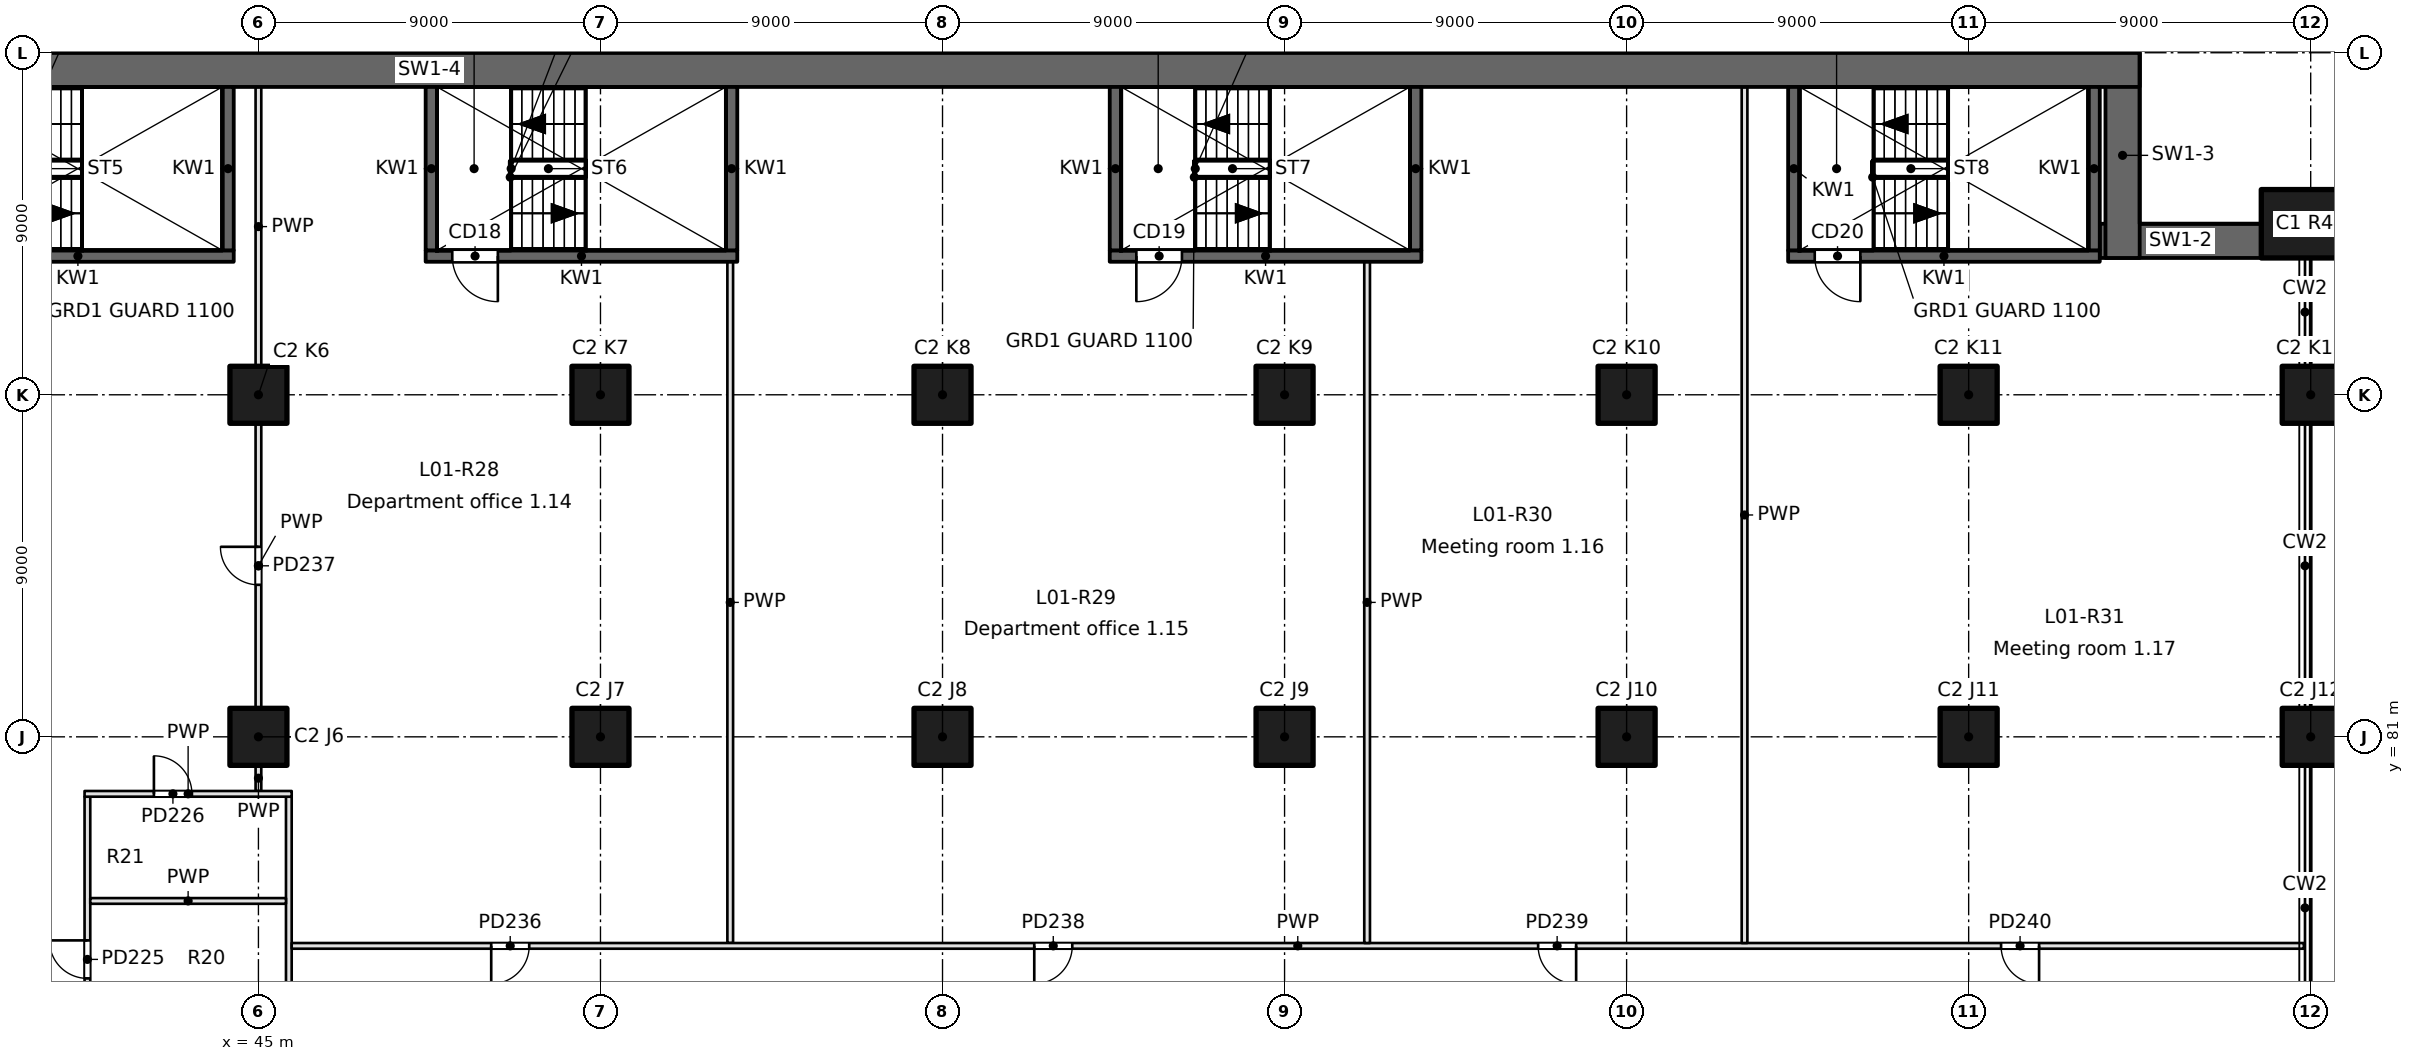
"""IFC4 building model, lengths in metres.
Left out: names, types, materials, properties, quantities, classifications, styles, units other than length and angle.
Written with IfcOpenShell. Run it as: python <this file> out.ifc"""

import sys

from ifc_helpers import new_model, si_unit, direction, frame, frame_2d, origin, origin_2d, place, context, subcontext, project, spatial, rectangle, extrude, element, fill, save


model = new_model("IFC4")
c1 = context("Model", 3, precision=1e-05, world=origin(), true_north=direction((0.0, 1.0)))
c2 = subcontext(c1, "Body", "Model", "MODEL_VIEW")
j1 = project(units=[si_unit("LENGTHUNIT", "METRE"), si_unit("PLANEANGLEUNIT", "RADIAN")], contexts=[c1])
p1 = place(None, origin())
s1 = spatial("IfcSite", under=j1, at=p1, CompositionType="ELEMENT")
p2 = place(p1, origin())
s2 = spatial("IfcBuilding", under=s1, at=p2, CompositionType="ELEMENT")
p3 = place(p2, frame((0.0, 0.0, 6.0)))
s3 = spatial("IfcBuildingStorey", under=s2, at=p3, CompositionType="ELEMENT", Elevation=6.0)
for number, where, z_axis, x_axis in (
    (1, (99.0, 81.0, 0.0), (0.0, 0.0, 1.0), (1.0, 0.0, 0.0)),
    (2, (99.0, 90.0, 0.0), (0.0, 0.0, 1.0), (1.0, 0.0, 0.0)),
):
    element("IfcColumn", number, at=place(p3, frame(where, z_axis=z_axis, x_axis=x_axis)), inside=s3, PredefinedType="COLUMN", context=c2, shape_type="SweptSolid", body=[
        extrude(rectangle(XDim=1.5, YDim=1.5, at=origin_2d()), origin(), (0.0, 0.0, 1.0), 5.4),
    ])
p4 = place(p3, frame((99.0, 94.5, 0.0), z_axis=(0.0, 0.0, 1.0), x_axis=(1.0, 0.0, 0.0)))
e3 = element("IfcColumn", 3, at=p4, inside=s3, PredefinedType="COLUMN", context=c2, shape_type="SweptSolid", body=[
    extrude(rectangle(XDim=2.6, YDim=1.8, at=origin_2d()), origin(), (0.0, 0.0, 1.0), 5.4),
])
for number, where, z_axis, x_axis in (
    (4, (45.0, 81.0, 0.0), (0.0, 0.0, 1.0), (1.0, 0.0, 0.0)),
    (5, (45.0, 90.0, 0.0), (0.0, 0.0, 1.0), (1.0, 0.0, 0.0)),
    (6, (54.0, 81.0, 0.0), (0.0, 0.0, 1.0), (1.0, 0.0, 0.0)),
    (7, (54.0, 90.0, 0.0), (0.0, 0.0, 1.0), (1.0, 0.0, 0.0)),
    (8, (63.0, 81.0, 0.0), (0.0, 0.0, 1.0), (1.0, 0.0, 0.0)),
    (9, (63.0, 90.0, 0.0), (0.0, 0.0, 1.0), (1.0, 0.0, 0.0)),
    (10, (72.0, 81.0, 0.0), (0.0, 0.0, 1.0), (1.0, 0.0, 0.0)),
    (11, (72.0, 90.0, 0.0), (0.0, 0.0, 1.0), (1.0, 0.0, 0.0)),
    (12, (81.0, 81.0, 0.0), (0.0, 0.0, 1.0), (1.0, 0.0, 0.0)),
    (13, (81.0, 90.0, 0.0), (0.0, 0.0, 1.0), (1.0, 0.0, 0.0)),
    (14, (90.0, 81.0, 0.0), (0.0, 0.0, 1.0), (1.0, 0.0, 0.0)),
    (15, (90.0, 90.0, 0.0), (0.0, 0.0, 1.0), (1.0, 0.0, 0.0)),
):
    element("IfcColumn", number, at=place(p3, frame(where, z_axis=z_axis, x_axis=x_axis)), inside=s3, PredefinedType="COLUMN", context=c2, shape_type="SweptSolid", body=[
        extrude(rectangle(XDim=1.5, YDim=1.5, at=origin_2d()), origin(), (0.0, 0.0, 1.0), 5.4),
    ])
p5 = place(p3, frame((97.7, 94.05, 0.0), z_axis=(0.0, 0.0, 1.0), x_axis=(-1.0, 0.0, 0.0)))
e16 = element("IfcWall", 16, at=p5, inside=s3, PredefinedType="SHEAR", context=c2, shape_type="SweptSolid", body=[
    extrude(rectangle(XDim=4.25, YDim=0.9, at=frame_2d((2.125, 0.0))), origin(), (0.0, 0.0, 1.0), 5.4),
])
p6 = place(p3, frame((94.05, 93.6, 0.0), z_axis=(0.0, 0.0, 1.0), x_axis=(0.0, 1.0, 0.0)))
e17 = element("IfcWall", 17, at=p6, inside=s3, PredefinedType="SHEAR", context=c2, shape_type="SweptSolid", body=[
    extrude(rectangle(XDim=5.4, YDim=0.9, at=frame_2d((2.7, 0.0))), origin(), (0.0, 0.0, 1.0), 5.4),
])
p7 = place(p3, frame((94.5, 98.55, 0.0), z_axis=(0.0, 0.0, 1.0), x_axis=(-1.0, 0.0, 0.0)))
e18 = element("IfcWall", 18, at=p7, inside=s3, PredefinedType="SHEAR", context=c2, shape_type="SweptSolid", body=[
    extrude(rectangle(XDim=90.0, YDim=0.9, at=frame_2d((45.0, 0.0))), origin(), (0.0, 0.0, 1.0), 5.4),
])
p8 = place(p3, frame((36.15, 93.65, -0.35), z_axis=(0.0, 0.0, 1.0), x_axis=(1.0, 0.0, 0.0)))
e19 = element("IfcWall", 19, at=p8, inside=s3, PredefinedType="SOLIDWALL", context=c2, shape_type="SweptSolid", body=[
    extrude(rectangle(XDim=8.2, YDim=0.3, at=frame_2d((4.1, 0.0))), origin(), (0.0, 0.0, 1.0), 5.4),
])
p9 = place(p8, frame((0.7, 0.0, 0.35)))
e20 = element("IfcOpeningElement", 20, at=p9, cuts=e19, PredefinedType="OPENING", context=c2, shape_type="SweptSolid", body=[
    extrude(rectangle(XDim=1.2, YDim=2.1, at=frame_2d((0.6, 1.05))), frame((0.0, 0.15, 0.0), z_axis=(0.0, -1.0, 0.0), x_axis=(1.0, 0.0, 0.0)), (0.0, 0.0, 1.0), 0.3),
])
p10 = place(p3, frame((49.4, 93.65, -0.35), z_axis=(0.0, 0.0, 1.0), x_axis=(1.0, 0.0, 0.0)))
e21 = element("IfcWall", 21, at=p10, inside=s3, PredefinedType="SOLIDWALL", context=c2, shape_type="SweptSolid", body=[
    extrude(rectangle(XDim=8.2, YDim=0.3, at=frame_2d((4.1, 0.0))), origin(), (0.0, 0.0, 1.0), 5.4),
])
p11 = place(p10, frame((0.7, 0.0, 0.35)))
e22 = element("IfcOpeningElement", 22, at=p11, cuts=e21, PredefinedType="OPENING", context=c2, shape_type="SweptSolid", body=[
    extrude(rectangle(XDim=1.2, YDim=2.1, at=frame_2d((0.6, 1.05))), frame((0.0, 0.15, 0.0), z_axis=(0.0, -1.0, 0.0), x_axis=(1.0, 0.0, 0.0)), (0.0, 0.0, 1.0), 0.3),
])
p12 = place(p3, frame((67.4, 93.65, -0.35), z_axis=(0.0, 0.0, 1.0), x_axis=(1.0, 0.0, 0.0)))
e23 = element("IfcWall", 23, at=p12, inside=s3, PredefinedType="SOLIDWALL", context=c2, shape_type="SweptSolid", body=[
    extrude(rectangle(XDim=8.2, YDim=0.3, at=frame_2d((4.1, 0.0))), origin(), (0.0, 0.0, 1.0), 5.4),
])
p13 = place(p12, frame((0.7, 0.0, 0.35)))
e24 = element("IfcOpeningElement", 24, at=p13, cuts=e23, PredefinedType="OPENING", context=c2, shape_type="SweptSolid", body=[
    extrude(rectangle(XDim=1.2, YDim=2.1, at=frame_2d((0.6, 1.05))), frame((0.0, 0.15, 0.0), z_axis=(0.0, -1.0, 0.0), x_axis=(1.0, 0.0, 0.0)), (0.0, 0.0, 1.0), 0.3),
])
p14 = place(p3, frame((85.25, 93.65, -0.35), z_axis=(0.0, 0.0, 1.0), x_axis=(1.0, 0.0, 0.0)))
e25 = element("IfcWall", 25, at=p14, inside=s3, PredefinedType="SOLIDWALL", context=c2, shape_type="SweptSolid", body=[
    extrude(rectangle(XDim=8.2, YDim=0.3, at=frame_2d((4.1, 0.0))), origin(), (0.0, 0.0, 1.0), 5.4),
])
p15 = place(p14, frame((0.7, 0.0, 0.35)))
e26 = element("IfcOpeningElement", 26, at=p15, cuts=e25, PredefinedType="OPENING", context=c2, shape_type="SweptSolid", body=[
    extrude(rectangle(XDim=1.2, YDim=2.1, at=frame_2d((0.6, 1.05))), frame((0.0, 0.15, 0.0), z_axis=(0.0, -1.0, 0.0), x_axis=(1.0, 0.0, 0.0)), (0.0, 0.0, 1.0), 0.3),
])
for number, where, z_axis, x_axis in (
    (27, (44.2, 93.8, -0.35), (0.0, 0.0, 1.0), (0.0, 1.0, 0.0)),
    (28, (49.55, 93.8, -0.35), (0.0, 0.0, 1.0), (0.0, 1.0, 0.0)),
    (29, (57.45, 93.8, -0.35), (0.0, 0.0, 1.0), (0.0, 1.0, 0.0)),
    (30, (67.55, 93.8, -0.35), (0.0, 0.0, 1.0), (0.0, 1.0, 0.0)),
    (31, (75.45, 93.8, -0.35), (0.0, 0.0, 1.0), (0.0, 1.0, 0.0)),
    (32, (85.4, 93.8, -0.35), (0.0, 0.0, 1.0), (0.0, 1.0, 0.0)),
    (33, (93.3, 93.8, -0.35), (0.0, 0.0, 1.0), (0.0, 1.0, 0.0)),
):
    element("IfcWall", number, at=place(p3, frame(where, z_axis=z_axis, x_axis=x_axis)), inside=s3, PredefinedType="SOLIDWALL", context=c2, shape_type="SweptSolid", body=[
        extrude(rectangle(XDim=4.3, YDim=0.3, at=frame_2d((2.15, 0.0))), origin(), (0.0, 0.0, 1.0), 5.4),
    ])
p16 = place(p3, frame((45.0, 79.575, 0.0), z_axis=(0.0, 0.0, 1.0), x_axis=(0.0, 1.0, 0.0)))
e34 = element("IfcWall", 34, at=p16, inside=s3, PredefinedType="PARTITIONING", context=c2, shape_type="SweptSolid", body=[
    extrude(rectangle(XDim=0.675, YDim=0.15, at=frame_2d((0.337, 0.0))), origin(), (0.0, 0.0, 1.0), 5.05),
])
p17 = place(p3, frame((45.0, 81.75, 0.0), z_axis=(0.0, 0.0, 1.0), x_axis=(0.0, 1.0, 0.0)))
e35 = element("IfcWall", 35, at=p17, inside=s3, PredefinedType="PARTITIONING", context=c2, shape_type="SweptSolid", body=[
    extrude(rectangle(XDim=7.5, YDim=0.15, at=frame_2d((3.75, 0.0))), origin(), (0.0, 0.0, 1.0), 5.05),
])
p18 = place(p17, frame((3.25, 0.0, 0.0)))
e36 = element("IfcOpeningElement", 36, at=p18, cuts=e35, PredefinedType="OPENING", context=c2, shape_type="SweptSolid", body=[
    extrude(rectangle(XDim=1.0, YDim=2.1, at=frame_2d((0.5, 1.05))), frame((0.0, 0.075, 0.0), z_axis=(0.0, -1.0, 0.0), x_axis=(1.0, 0.0, 0.0)), (0.0, 0.0, 1.0), 0.15),
])
p19 = place(p3, frame((45.0, 90.75, 0.0), z_axis=(0.0, 0.0, 1.0), x_axis=(0.0, 1.0, 0.0)))
e37 = element("IfcWall", 37, at=p19, inside=s3, PredefinedType="PARTITIONING", context=c2, shape_type="SweptSolid", body=[
    extrude(rectangle(XDim=7.35, YDim=0.15, at=frame_2d((3.675, 0.0))), origin(), (0.0, 0.0, 1.0), 5.05),
])
p20 = place(p3, frame((45.8, 79.425, 0.0), z_axis=(0.0, 0.0, 1.0), x_axis=(0.0, -1.0, 0.0)))
e38 = element("IfcWall", 38, at=p20, inside=s3, PredefinedType="PARTITIONING", context=c2, shape_type="SweptSolid", body=[
    extrude(rectangle(XDim=15.35, YDim=0.15, at=frame_2d((7.675, 0.0))), origin(), (0.0, 0.0, 1.0), 5.05),
])
p21 = place(p3, frame((40.5, 64.075, 0.0), z_axis=(0.0, 0.0, 1.0), x_axis=(0.0, 1.0, 0.0)))
e39 = element("IfcWall", 39, at=p21, inside=s3, PredefinedType="PARTITIONING", context=c2, shape_type="SweptSolid", body=[
    extrude(rectangle(XDim=15.35, YDim=0.15, at=frame_2d((7.675, 0.0))), origin(), (0.0, 0.0, 1.0), 5.05),
])
p22 = place(p21, frame((1.75, 0.0, 0.0)))
e40 = element("IfcOpeningElement", 40, at=p22, cuts=e39, PredefinedType="OPENING", context=c2, shape_type="SweptSolid", body=[
    extrude(rectangle(XDim=1.0, YDim=2.1, at=frame_2d((0.5, 1.05))), frame((0.0, 0.075, 0.0), z_axis=(0.0, -1.0, 0.0), x_axis=(1.0, 0.0, 0.0)), (0.0, 0.0, 1.0), 0.15),
])
p23 = place(p21, frame((6.372, 0.0, 0.0)))
e41 = element("IfcOpeningElement", 41, at=p23, cuts=e39, PredefinedType="OPENING", context=c2, shape_type="SweptSolid", body=[
    extrude(rectangle(XDim=1.0, YDim=2.1, at=frame_2d((0.5, 1.05))), frame((0.0, 0.075, 0.0), z_axis=(0.0, -1.0, 0.0), x_axis=(1.0, 0.0, 0.0)), (0.0, 0.0, 1.0), 0.15),
])
p24 = place(p21, frame((10.569, 0.0, 0.0)))
e42 = element("IfcOpeningElement", 42, at=p24, cuts=e39, PredefinedType="OPENING", context=c2, shape_type="SweptSolid", body=[
    extrude(rectangle(XDim=1.0, YDim=2.1, at=frame_2d((0.5, 1.05))), frame((0.0, 0.075, 0.0), z_axis=(0.0, -1.0, 0.0), x_axis=(1.0, 0.0, 0.0)), (0.0, 0.0, 1.0), 0.15),
])
p25 = place(p3, frame((40.575, 76.682, 0.0), z_axis=(0.0, 0.0, 1.0), x_axis=(1.0, 0.0, 0.0)))
e43 = element("IfcWall", 43, at=p25, inside=s3, PredefinedType="PARTITIONING", context=c2, shape_type="SweptSolid", body=[
    extrude(rectangle(XDim=5.15, YDim=0.15, at=frame_2d((2.575, 0.0))), origin(), (0.0, 0.0, 1.0), 5.05),
])
p26 = place(p3, frame((40.425, 79.5, 0.0), z_axis=(0.0, 0.0, 1.0), x_axis=(1.0, 0.0, 0.0)))
e44 = element("IfcWall", 44, at=p26, inside=s3, PredefinedType="PARTITIONING", context=c2, shape_type="SweptSolid", body=[
    extrude(rectangle(XDim=5.45, YDim=0.15, at=frame_2d((2.725, 0.0))), origin(), (0.0, 0.0, 1.0), 5.05),
])
p27 = place(p26, frame((1.825, 0.0, 0.0)))
e45 = element("IfcOpeningElement", 45, at=p27, cuts=e44, PredefinedType="OPENING", context=c2, shape_type="SweptSolid", body=[
    extrude(rectangle(XDim=1.0, YDim=2.1, at=frame_2d((0.5, 1.05))), frame((0.0, 0.075, 0.0), z_axis=(0.0, -1.0, 0.0), x_axis=(1.0, 0.0, 0.0)), (0.0, 0.0, 1.0), 0.15),
])
p28 = place(p3, frame((57.414, 75.575, 0.0), z_axis=(0.0, 0.0, 1.0), x_axis=(0.0, 1.0, 0.0)))
e46 = element("IfcWall", 46, at=p28, inside=s3, PredefinedType="PARTITIONING", context=c2, shape_type="SweptSolid", body=[
    extrude(rectangle(XDim=17.925, YDim=0.15, at=frame_2d((8.962, 0.0))), origin(), (0.0, 0.0, 1.0), 5.05),
])
p29 = place(p3, frame((98.82, 75.5, 0.0), z_axis=(0.0, 0.0, 1.0), x_axis=(-1.0, 0.0, 0.0)))
e47 = element("IfcWall", 47, at=p29, inside=s3, PredefinedType="PARTITIONING", context=c2, shape_type="SweptSolid", body=[
    extrude(rectangle(XDim=52.945, YDim=0.15, at=frame_2d((26.473, 0.0))), origin(), (0.0, 0.0, 1.0), 5.05),
])
p30 = place(p29, frame((46.695, 0.0, 0.0)))
e48 = element("IfcOpeningElement", 48, at=p30, cuts=e47, PredefinedType="OPENING", context=c2, shape_type="SweptSolid", body=[
    extrude(rectangle(XDim=1.0, YDim=2.1, at=frame_2d((0.5, 1.05))), frame((0.0, 0.075, 0.0), z_axis=(0.0, -1.0, 0.0), x_axis=(1.0, 0.0, 0.0)), (0.0, 0.0, 1.0), 0.15),
])
p31 = place(p29, frame((32.406, 0.0, 0.0)))
e49 = element("IfcOpeningElement", 49, at=p31, cuts=e47, PredefinedType="OPENING", context=c2, shape_type="SweptSolid", body=[
    extrude(rectangle(XDim=1.0, YDim=2.1, at=frame_2d((0.5, 1.05))), frame((0.0, 0.075, 0.0), z_axis=(0.0, -1.0, 0.0), x_axis=(1.0, 0.0, 0.0)), (0.0, 0.0, 1.0), 0.15),
])
p32 = place(p29, frame((19.148, 0.0, 0.0)))
e50 = element("IfcOpeningElement", 50, at=p32, cuts=e47, PredefinedType="OPENING", context=c2, shape_type="SweptSolid", body=[
    extrude(rectangle(XDim=1.0, YDim=2.1, at=frame_2d((0.5, 1.05))), frame((0.0, 0.075, 0.0), z_axis=(0.0, -1.0, 0.0), x_axis=(1.0, 0.0, 0.0)), (0.0, 0.0, 1.0), 0.15),
])
p33 = place(p29, frame((6.967, 0.0, 0.0)))
e51 = element("IfcOpeningElement", 51, at=p33, cuts=e47, PredefinedType="OPENING", context=c2, shape_type="SweptSolid", body=[
    extrude(rectangle(XDim=1.0, YDim=2.1, at=frame_2d((0.5, 1.05))), frame((0.0, 0.075, 0.0), z_axis=(0.0, -1.0, 0.0), x_axis=(1.0, 0.0, 0.0)), (0.0, 0.0, 1.0), 0.15),
])
p34 = place(p3, frame((74.172, 75.575, 0.0), z_axis=(0.0, 0.0, 1.0), x_axis=(0.0, 1.0, 0.0)))
e52 = element("IfcWall", 52, at=p34, inside=s3, PredefinedType="PARTITIONING", context=c2, shape_type="SweptSolid", body=[
    extrude(rectangle(XDim=17.925, YDim=0.15, at=frame_2d((8.962, 0.0))), origin(), (0.0, 0.0, 1.0), 5.05),
])
p35 = place(p3, frame((84.103, 75.575, 0.0), z_axis=(0.0, 0.0, 1.0), x_axis=(0.0, 1.0, 0.0)))
e53 = element("IfcWall", 53, at=p35, inside=s3, PredefinedType="PARTITIONING", context=c2, shape_type="SweptSolid", body=[
    extrude(rectangle(XDim=22.525, YDim=0.15, at=frame_2d((11.263, 0.0))), origin(), (0.0, 0.0, 1.0), 5.05),
])
p36 = place(p11, frame((1.2, 0.0, 0.0), z_axis=(0.0, 0.0, 1.0), x_axis=(-1.0, 0.0, 0.0)))
e54 = element("IfcDoor", 54, at=p36, inside=s3, OperationType="SINGLE_SWING_LEFT", PredefinedType="DOOR", context=c2, shape_type="SweptSolid", body=[
    extrude(rectangle(XDim=1.2, YDim=2.1, at=frame_2d((0.6, 1.05))), frame((0.0, 0.025, 0.0), z_axis=(0.0, -1.0, 0.0), x_axis=(1.0, 0.0, 0.0)), (0.0, 0.0, 1.0), 0.05),
])
fill(e22, e54)
p37 = place(p13, frame((1.2, 0.0, 0.0), z_axis=(0.0, 0.0, 1.0), x_axis=(-1.0, 0.0, 0.0)))
e55 = element("IfcDoor", 55, at=p37, inside=s3, OperationType="SINGLE_SWING_RIGHT", PredefinedType="DOOR", context=c2, shape_type="SweptSolid", body=[
    extrude(rectangle(XDim=1.2, YDim=2.1, at=frame_2d((0.6, 1.05))), frame((0.0, 0.025, 0.0), z_axis=(0.0, -1.0, 0.0), x_axis=(1.0, 0.0, 0.0)), (0.0, 0.0, 1.0), 0.05),
])
fill(e24, e55)
p38 = place(p15, frame((1.2, 0.0, 0.0), z_axis=(0.0, 0.0, 1.0), x_axis=(-1.0, 0.0, 0.0)))
e56 = element("IfcDoor", 56, at=p38, inside=s3, OperationType="SINGLE_SWING_LEFT", PredefinedType="DOOR", context=c2, shape_type="SweptSolid", body=[
    extrude(rectangle(XDim=1.2, YDim=2.1, at=frame_2d((0.6, 1.05))), frame((0.0, 0.025, 0.0), z_axis=(0.0, -1.0, 0.0), x_axis=(1.0, 0.0, 0.0)), (0.0, 0.0, 1.0), 0.05),
])
fill(e26, e56)
p39 = place(p24, origin())
e57 = element("IfcDoor", 57, at=p39, inside=s3, OperationType="SINGLE_SWING_RIGHT", PredefinedType="DOOR", context=c2, shape_type="SweptSolid", body=[
    extrude(rectangle(XDim=1.0, YDim=2.1, at=frame_2d((0.5, 1.05))), frame((0.0, 0.025, 0.0), z_axis=(0.0, -1.0, 0.0), x_axis=(1.0, 0.0, 0.0)), (0.0, 0.0, 1.0), 0.05),
])
fill(e42, e57)
p40 = place(p27, origin())
e58 = element("IfcDoor", 58, at=p40, inside=s3, OperationType="SINGLE_SWING_LEFT", PredefinedType="DOOR", context=c2, shape_type="SweptSolid", body=[
    extrude(rectangle(XDim=1.0, YDim=2.1, at=frame_2d((0.5, 1.05))), frame((0.0, 0.025, 0.0), z_axis=(0.0, -1.0, 0.0), x_axis=(1.0, 0.0, 0.0)), (0.0, 0.0, 1.0), 0.05),
])
fill(e45, e58)
p41 = place(p30, origin())
e59 = element("IfcDoor", 59, at=p41, inside=s3, OperationType="SINGLE_SWING_RIGHT", PredefinedType="DOOR", context=c2, shape_type="SweptSolid", body=[
    extrude(rectangle(XDim=1.0, YDim=2.1, at=frame_2d((0.5, 1.05))), frame((0.0, 0.025, 0.0), z_axis=(0.0, -1.0, 0.0), x_axis=(1.0, 0.0, 0.0)), (0.0, 0.0, 1.0), 0.05),
])
fill(e48, e59)
p42 = place(p18, origin())
e60 = element("IfcDoor", 60, at=p42, inside=s3, OperationType="SINGLE_SWING_RIGHT", PredefinedType="DOOR", context=c2, shape_type="SweptSolid", body=[
    extrude(rectangle(XDim=1.0, YDim=2.1, at=frame_2d((0.5, 1.05))), frame((0.0, 0.025, 0.0), z_axis=(0.0, -1.0, 0.0), x_axis=(1.0, 0.0, 0.0)), (0.0, 0.0, 1.0), 0.05),
])
fill(e36, e60)
p43 = place(p31, origin())
e61 = element("IfcDoor", 61, at=p43, inside=s3, OperationType="SINGLE_SWING_RIGHT", PredefinedType="DOOR", context=c2, shape_type="SweptSolid", body=[
    extrude(rectangle(XDim=1.0, YDim=2.1, at=frame_2d((0.5, 1.05))), frame((0.0, 0.025, 0.0), z_axis=(0.0, -1.0, 0.0), x_axis=(1.0, 0.0, 0.0)), (0.0, 0.0, 1.0), 0.05),
])
fill(e49, e61)
p44 = place(p32, origin())
e62 = element("IfcDoor", 62, at=p44, inside=s3, OperationType="SINGLE_SWING_LEFT", PredefinedType="DOOR", context=c2, shape_type="SweptSolid", body=[
    extrude(rectangle(XDim=1.0, YDim=2.1, at=frame_2d((0.5, 1.05))), frame((0.0, 0.025, 0.0), z_axis=(0.0, -1.0, 0.0), x_axis=(1.0, 0.0, 0.0)), (0.0, 0.0, 1.0), 0.05),
])
fill(e50, e62)
p45 = place(p33, origin())
e63 = element("IfcDoor", 63, at=p45, inside=s3, OperationType="SINGLE_SWING_LEFT", PredefinedType="DOOR", context=c2, shape_type="SweptSolid", body=[
    extrude(rectangle(XDim=1.0, YDim=2.1, at=frame_2d((0.5, 1.05))), frame((0.0, 0.025, 0.0), z_axis=(0.0, -1.0, 0.0), x_axis=(1.0, 0.0, 0.0)), (0.0, 0.0, 1.0), 0.05),
])
fill(e51, e63)
save(model, sys.argv[1])
